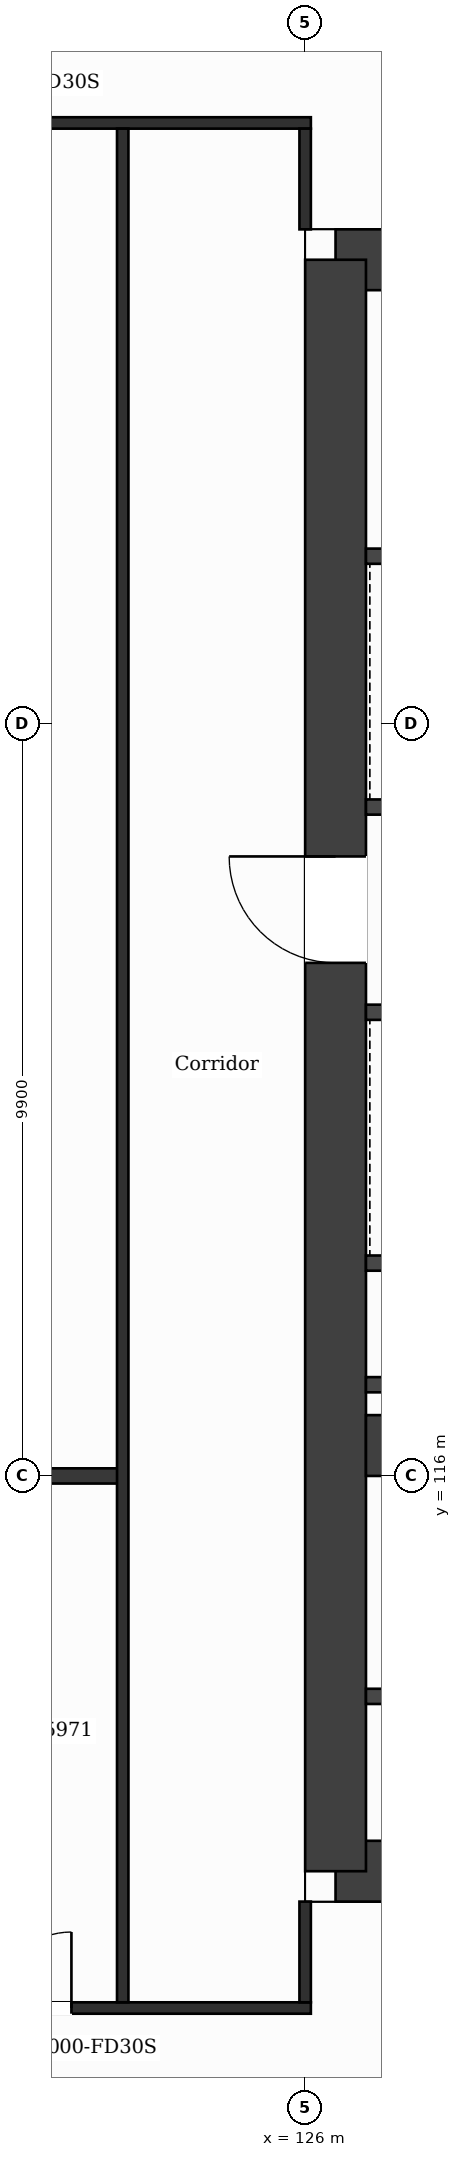
"""IFC4 building model, lengths in metres.
Left out: names, types, materials, properties, quantities, classifications, styles, units other than length and angle.
Written with IfcOpenShell. Run it as: python <this file> out.ifc"""

import sys

from ifc_helpers import new_model, si_unit, direction, frame, frame_2d, origin, place, context, subcontext, project, spatial, rectangle, extrude, element, fill, save


model = new_model("IFC4")
c1 = context("Model", 3, precision=1e-05, world=origin(), true_north=direction((0.0, 1.0)))
c2 = subcontext(c1, "Body", "Model", "MODEL_VIEW")
j1 = project(units=[si_unit("LENGTHUNIT", "METRE"), si_unit("PLANEANGLEUNIT", "RADIAN")], contexts=[c1])
p1 = place(None, origin())
s1 = spatial("IfcSite", under=j1, at=p1, CompositionType="ELEMENT")
p2 = place(p1, origin())
s2 = spatial("IfcBuilding", under=s1, at=p2, CompositionType="ELEMENT")
p3 = place(p2, frame((0.0, 0.0, 242.9)))
s3 = spatial("IfcBuildingStorey", under=s2, at=p3, CompositionType="ELEMENT", Elevation=242.9)
p4 = place(p3, frame((126.4, 132.0, 0.0), z_axis=(0.0, 0.0, 1.0), x_axis=(1.0, 0.0, 0.0)))
e1 = element("IfcWall", 1, at=p4, inside=s3, PredefinedType="SHEAR", context=c2, shape_type="SweptSolid", body=[
    extrude(rectangle(XDim=11.42, YDim=0.8, at=frame_2d((5.71, 0.0))), origin(), (0.0, 0.0, 1.0), 3.7),
])
p5 = place(p4, frame((3.386, 0.0, 0.0)))
e2 = element("IfcOpeningElement", 2, at=p5, cuts=e1, PredefinedType="OPENING", context=c2, shape_type="SweptSolid", body=[
    extrude(rectangle(XDim=1.2, YDim=2.1, at=frame_2d((0.6, 1.05))), frame((0.0, 0.41, 0.0), z_axis=(0.0, -1.0, 0.0), x_axis=(1.0, 0.0, 0.0)), (0.0, 0.0, 1.0), 0.82),
])
p6 = place(p3, frame((140.673, 110.8, 0.0), z_axis=(0.0, 0.0, 1.0), x_axis=(-1.0, 0.0, 0.0)))
e3 = element("IfcWall", 3, at=p6, inside=s3, PredefinedType="SHEAR", context=c2, shape_type="SweptSolid", body=[
    extrude(rectangle(XDim=14.273, YDim=0.8, at=frame_2d((7.137, 0.0))), origin(), (0.0, 0.0, 1.0), 3.7),
])
p7 = place(p6, frame((6.965, 0.0, 0.0)))
e4 = element("IfcOpeningElement", 4, at=p7, cuts=e3, PredefinedType="OPENING", context=c2, shape_type="SweptSolid", body=[
    extrude(rectangle(XDim=1.4, YDim=2.1, at=frame_2d((0.7, 1.05))), frame((0.0, 0.41, 0.0), z_axis=(0.0, -1.0, 0.0), x_axis=(1.0, 0.0, 0.0)), (0.0, 0.0, 1.0), 0.82),
])
p8 = place(p3, frame((126.4, 110.8, 0.0), z_axis=(0.0, 0.0, 1.0), x_axis=(0.0, 1.0, 0.0)))
e5 = element("IfcWall", 5, at=p8, inside=s3, PredefinedType="SHEAR", context=c2, shape_type="SweptSolid", body=[
    extrude(rectangle(XDim=21.2, YDim=0.8, at=frame_2d((10.6, 0.0))), origin(), (0.0, 0.0, 1.0), 3.7),
])
p9 = place(p8, frame((11.95, 0.0, 0.0)))
e6 = element("IfcOpeningElement", 6, at=p9, cuts=e5, PredefinedType="OPENING", context=c2, shape_type="SweptSolid", body=[
    extrude(rectangle(XDim=1.4, YDim=2.1, at=frame_2d((0.7, 1.05))), frame((0.0, 0.41, 0.0), z_axis=(0.0, -1.0, 0.0), x_axis=(1.0, 0.0, 0.0)), (0.0, 0.0, 1.0), 0.82),
])
p10 = place(p3, frame((126.8, 116.4, 0.0), z_axis=(0.0, 0.0, 1.0), x_axis=(1.0, 0.0, 0.0)))
e7 = element("IfcWall", 7, at=p10, inside=s3, PredefinedType="SHEAR", context=c2, shape_type="SweptSolid", body=[
    extrude(rectangle(XDim=5.3, YDim=0.8, at=frame_2d((2.65, 0.0))), origin(), (0.0, 0.0, 1.0), 3.7),
])
p11 = place(p3, frame((100.725, 109.0, 0.0), z_axis=(0.0, 0.0, 1.0), x_axis=(1.0, 0.0, 0.0)))
e8 = element("IfcWall", 8, at=p11, inside=s3, PredefinedType="PARTITIONING", context=c2, shape_type="SweptSolid", body=[
    extrude(rectangle(XDim=25.35, YDim=0.15, at=frame_2d((12.675, 0.0))), origin(), (0.0, 0.0, 1.0), 3.2),
])
p12 = place(p11, frame((21.2, 0.0, 0.0)))
e9 = element("IfcOpeningElement", 9, at=p12, cuts=e8, PredefinedType="OPENING", context=c2, shape_type="SweptSolid", body=[
    extrude(rectangle(XDim=1.0, YDim=2.1, at=frame_2d((0.5, 1.05))), frame((0.0, 0.085, 0.0), z_axis=(0.0, -1.0, 0.0), x_axis=(1.0, 0.0, 0.0)), (0.0, 0.0, 1.0), 0.17),
])
p13 = place(p11, frame((3.9, 0.0, 0.0)))
e10 = element("IfcOpeningElement", 10, at=p13, cuts=e8, PredefinedType="OPENING", context=c2, shape_type="SweptSolid", body=[
    extrude(rectangle(XDim=1.0, YDim=2.1, at=frame_2d((0.5, 1.05))), frame((0.0, 0.085, 0.0), z_axis=(0.0, -1.0, 0.0), x_axis=(1.0, 0.0, 0.0)), (0.0, 0.0, 1.0), 0.17),
])
p14 = place(p11, frame((10.5, 0.0, 0.0)))
e11 = element("IfcOpeningElement", 11, at=p14, cuts=e8, PredefinedType="OPENING", context=c2, shape_type="SweptSolid", body=[
    extrude(rectangle(XDim=1.0, YDim=2.1, at=frame_2d((0.5, 1.05))), frame((0.0, 0.085, 0.0), z_axis=(0.0, -1.0, 0.0), x_axis=(1.0, 0.0, 0.0)), (0.0, 0.0, 1.0), 0.17),
])
p15 = place(p11, frame((17.875, 0.0, 0.0)))
e12 = element("IfcOpeningElement", 12, at=p15, cuts=e8, PredefinedType="OPENING", context=c2, shape_type="SweptSolid", body=[
    extrude(rectangle(XDim=1.0, YDim=2.1, at=frame_2d((0.5, 1.05))), frame((0.0, 0.085, 0.0), z_axis=(0.0, -1.0, 0.0), x_axis=(1.0, 0.0, 0.0)), (0.0, 0.0, 1.0), 0.17),
])
p16 = place(p3, frame((126.8, 113.1, 0.0), z_axis=(0.0, 0.0, 1.0), x_axis=(1.0, 0.0, 0.0)))
e13 = element("IfcWall", 13, at=p16, inside=s3, PredefinedType="PARTITIONING", context=c2, shape_type="SweptSolid", body=[
    extrude(rectangle(XDim=4.873, YDim=0.2, at=frame_2d((2.437, 0.0))), origin(), (0.0, 0.0, 1.0), 3.2),
])
p17 = place(p16, frame((0.743, 0.0, 0.0)))
e14 = element("IfcOpeningElement", 14, at=p17, cuts=e13, PredefinedType="OPENING", context=c2, shape_type="SweptSolid", body=[
    extrude(rectangle(XDim=0.9, YDim=2.1, at=frame_2d((0.45, 1.05))), frame((0.0, 0.11, 0.0), z_axis=(0.0, -1.0, 0.0), x_axis=(1.0, 0.0, 0.0)), (0.0, 0.0, 1.0), 0.22),
])
p18 = place(p3, frame((117.6, 116.0, 0.0), z_axis=(0.0, 0.0, 1.0), x_axis=(1.0, 0.0, 0.0)))
e15 = element("IfcWall", 15, at=p18, inside=s3, PredefinedType="PARTITIONING", context=c2, shape_type="SweptSolid", body=[
    extrude(rectangle(XDim=6.0, YDim=0.2, at=frame_2d((3.0, 0.0))), origin(), (0.0, 0.0, 1.0), 3.2),
])
for number, where, z_axis, x_axis in (
    (16, (126.8, 117.2, 0.0), (0.0, 0.0, 1.0), (1.0, 0.0, 0.0)),
    (17, (126.8, 118.8, 0.0), (0.0, 0.0, 1.0), (1.0, 0.0, 0.0)),
):
    element("IfcWall", number, at=place(p3, frame(where, z_axis=z_axis, x_axis=x_axis)), inside=s3, PredefinedType="PARTITIONING", context=c2, shape_type="SweptSolid", body=[
        extrude(rectangle(XDim=4.773, YDim=0.2, at=frame_2d((2.386, 0.0))), origin(), (0.0, 0.0, 1.0), 3.2),
    ])
p19 = place(p3, frame((126.8, 122.1, 0.0), z_axis=(0.0, 0.0, 1.0), x_axis=(1.0, 0.0, 0.0)))
e18 = element("IfcWall", 18, at=p19, inside=s3, PredefinedType="PARTITIONING", context=c2, shape_type="SweptSolid", body=[
    extrude(rectangle(XDim=4.773, YDim=0.2, at=frame_2d((2.386, 0.0))), origin(), (0.0, 0.0, 1.0), 3.2),
])
p20 = place(p19, frame((2.883, 0.0, 0.0)))
e19 = element("IfcOpeningElement", 19, at=p20, cuts=e18, PredefinedType="OPENING", context=c2, shape_type="SweptSolid", body=[
    extrude(rectangle(XDim=1.1, YDim=2.1, at=frame_2d((0.55, 1.05))), frame((0.0, 0.11, 0.0), z_axis=(0.0, -1.0, 0.0), x_axis=(1.0, 0.0, 0.0)), (0.0, 0.0, 1.0), 0.22),
])
p21 = place(p19, frame((0.643, 0.0, 0.0)))
e20 = element("IfcOpeningElement", 20, at=p21, cuts=e18, PredefinedType="OPENING", context=c2, shape_type="SweptSolid", body=[
    extrude(rectangle(XDim=1.1, YDim=2.1, at=frame_2d((0.55, 1.05))), frame((0.0, 0.11, 0.0), z_axis=(0.0, -1.0, 0.0), x_axis=(1.0, 0.0, 0.0)), (0.0, 0.0, 1.0), 0.22),
])
p22 = place(p3, frame((126.8, 124.8, 0.0), z_axis=(0.0, 0.0, 1.0), x_axis=(1.0, 0.0, 0.0)))
e21 = element("IfcWall", 21, at=p22, inside=s3, PredefinedType="PARTITIONING", context=c2, shape_type="SweptSolid", body=[
    extrude(rectangle(XDim=4.782, YDim=0.2, at=frame_2d((2.391, 0.0))), origin(), (0.0, 0.0, 1.0), 3.2),
])
p23 = place(p22, frame((0.586, 0.0, 0.0)))
e22 = element("IfcOpeningElement", 22, at=p23, cuts=e21, PredefinedType="OPENING", context=c2, shape_type="SweptSolid", body=[
    extrude(rectangle(XDim=1.1, YDim=2.1, at=frame_2d((0.55, 1.05))), frame((0.0, 0.11, 0.0), z_axis=(0.0, -1.0, 0.0), x_axis=(1.0, 0.0, 0.0)), (0.0, 0.0, 1.0), 0.22),
])
p24 = place(p3, frame((126.8, 128.1, 0.0), z_axis=(0.0, 0.0, 1.0), x_axis=(1.0, 0.0, 0.0)))
e23 = element("IfcWall", 23, at=p24, inside=s3, PredefinedType="PARTITIONING", context=c2, shape_type="SweptSolid", body=[
    extrude(rectangle(XDim=4.782, YDim=0.2, at=frame_2d((2.391, 0.0))), origin(), (0.0, 0.0, 1.0), 3.2),
])
p25 = place(p24, frame((3.184, 0.0, 0.0)))
e24 = element("IfcOpeningElement", 24, at=p25, cuts=e23, PredefinedType="OPENING", context=c2, shape_type="SweptSolid", body=[
    extrude(rectangle(XDim=1.1, YDim=2.1, at=frame_2d((0.55, 1.05))), frame((0.0, 0.11, 0.0), z_axis=(0.0, -1.0, 0.0), x_axis=(1.0, 0.0, 0.0)), (0.0, 0.0, 1.0), 0.22),
])
p26 = place(p3, frame((100.725, 133.8, 0.0), z_axis=(0.0, 0.0, 1.0), x_axis=(1.0, 0.0, 0.0)))
e25 = element("IfcWall", 25, at=p26, inside=s3, PredefinedType="PARTITIONING", context=c2, shape_type="SweptSolid", body=[
    extrude(rectangle(XDim=25.35, YDim=0.15, at=frame_2d((12.675, 0.0))), origin(), (0.0, 0.0, 1.0), 3.2),
])
p27 = place(p26, frame((4.975, 0.0, 0.0)))
e26 = element("IfcOpeningElement", 26, at=p27, cuts=e25, PredefinedType="OPENING", context=c2, shape_type="SweptSolid", body=[
    extrude(rectangle(XDim=1.0, YDim=2.1, at=frame_2d((0.5, 1.05))), frame((0.0, 0.085, 0.0), z_axis=(0.0, -1.0, 0.0), x_axis=(1.0, 0.0, 0.0)), (0.0, 0.0, 1.0), 0.17),
])
p28 = place(p26, frame((12.175, 0.0, 0.0)))
e27 = element("IfcOpeningElement", 27, at=p28, cuts=e25, PredefinedType="OPENING", context=c2, shape_type="SweptSolid", body=[
    extrude(rectangle(XDim=1.0, YDim=2.1, at=frame_2d((0.5, 1.05))), frame((0.0, 0.085, 0.0), z_axis=(0.0, -1.0, 0.0), x_axis=(1.0, 0.0, 0.0)), (0.0, 0.0, 1.0), 0.17),
])
p29 = place(p26, frame((20.45, 0.0, 0.0)))
e28 = element("IfcOpeningElement", 28, at=p29, cuts=e25, PredefinedType="OPENING", context=c2, shape_type="SweptSolid", body=[
    extrude(rectangle(XDim=1.0, YDim=2.1, at=frame_2d((0.5, 1.05))), frame((0.0, 0.085, 0.0), z_axis=(0.0, -1.0, 0.0), x_axis=(1.0, 0.0, 0.0)), (0.0, 0.0, 1.0), 0.17),
])
p30 = place(p3, frame((123.6, 109.075, 0.0), z_axis=(0.0, 0.0, 1.0), x_axis=(0.0, 1.0, 0.0)))
e29 = element("IfcWall", 29, at=p30, inside=s3, PredefinedType="PARTITIONING", context=c2, shape_type="SweptSolid", body=[
    extrude(rectangle(XDim=24.65, YDim=0.15, at=frame_2d((12.325, 0.0))), origin(), (0.0, 0.0, 1.0), 3.2),
])
p31 = place(p3, frame((126.0, 109.075, 0.0), z_axis=(0.0, 0.0, 1.0), x_axis=(0.0, 1.0, 0.0)))
e30 = element("IfcWall", 30, at=p31, inside=s3, PredefinedType="PARTITIONING", context=c2, shape_type="SweptSolid", body=[
    extrude(rectangle(XDim=1.325, YDim=0.15, at=frame_2d((0.663, 0.0))), origin(), (0.0, 0.0, 1.0), 3.2),
])
p32 = place(p3, frame((126.0, 132.4, 0.0), z_axis=(0.0, 0.0, 1.0), x_axis=(0.0, 1.0, 0.0)))
e31 = element("IfcWall", 31, at=p32, inside=s3, PredefinedType="PARTITIONING", context=c2, shape_type="SweptSolid", body=[
    extrude(rectangle(XDim=1.325, YDim=0.15, at=frame_2d((0.663, 0.0))), origin(), (0.0, 0.0, 1.0), 3.2),
])
p33 = place(p12, origin())
e32 = element("IfcDoor", 32, at=p33, inside=s3, OperationType="SINGLE_SWING_RIGHT", PredefinedType="DOOR", context=c2, shape_type="SweptSolid", body=[
    extrude(rectangle(XDim=1.0, YDim=2.1, at=frame_2d((0.5, 1.05))), frame((0.0, 0.025, 0.0), z_axis=(0.0, -1.0, 0.0), x_axis=(1.0, 0.0, 0.0)), (0.0, 0.0, 1.0), 0.05),
])
fill(e9, e32)
p34 = place(p9, origin())
e33 = element("IfcDoor", 33, at=p34, inside=s3, OperationType="SINGLE_SWING_RIGHT", PredefinedType="DOOR", context=c2, shape_type="SweptSolid", body=[
    extrude(rectangle(XDim=1.4, YDim=2.1, at=frame_2d((0.7, 1.05))), frame((0.0, 0.025, 0.0), z_axis=(0.0, -1.0, 0.0), x_axis=(1.0, 0.0, 0.0)), (0.0, 0.0, 1.0), 0.05),
])
fill(e6, e33)
save(model, sys.argv[1])
